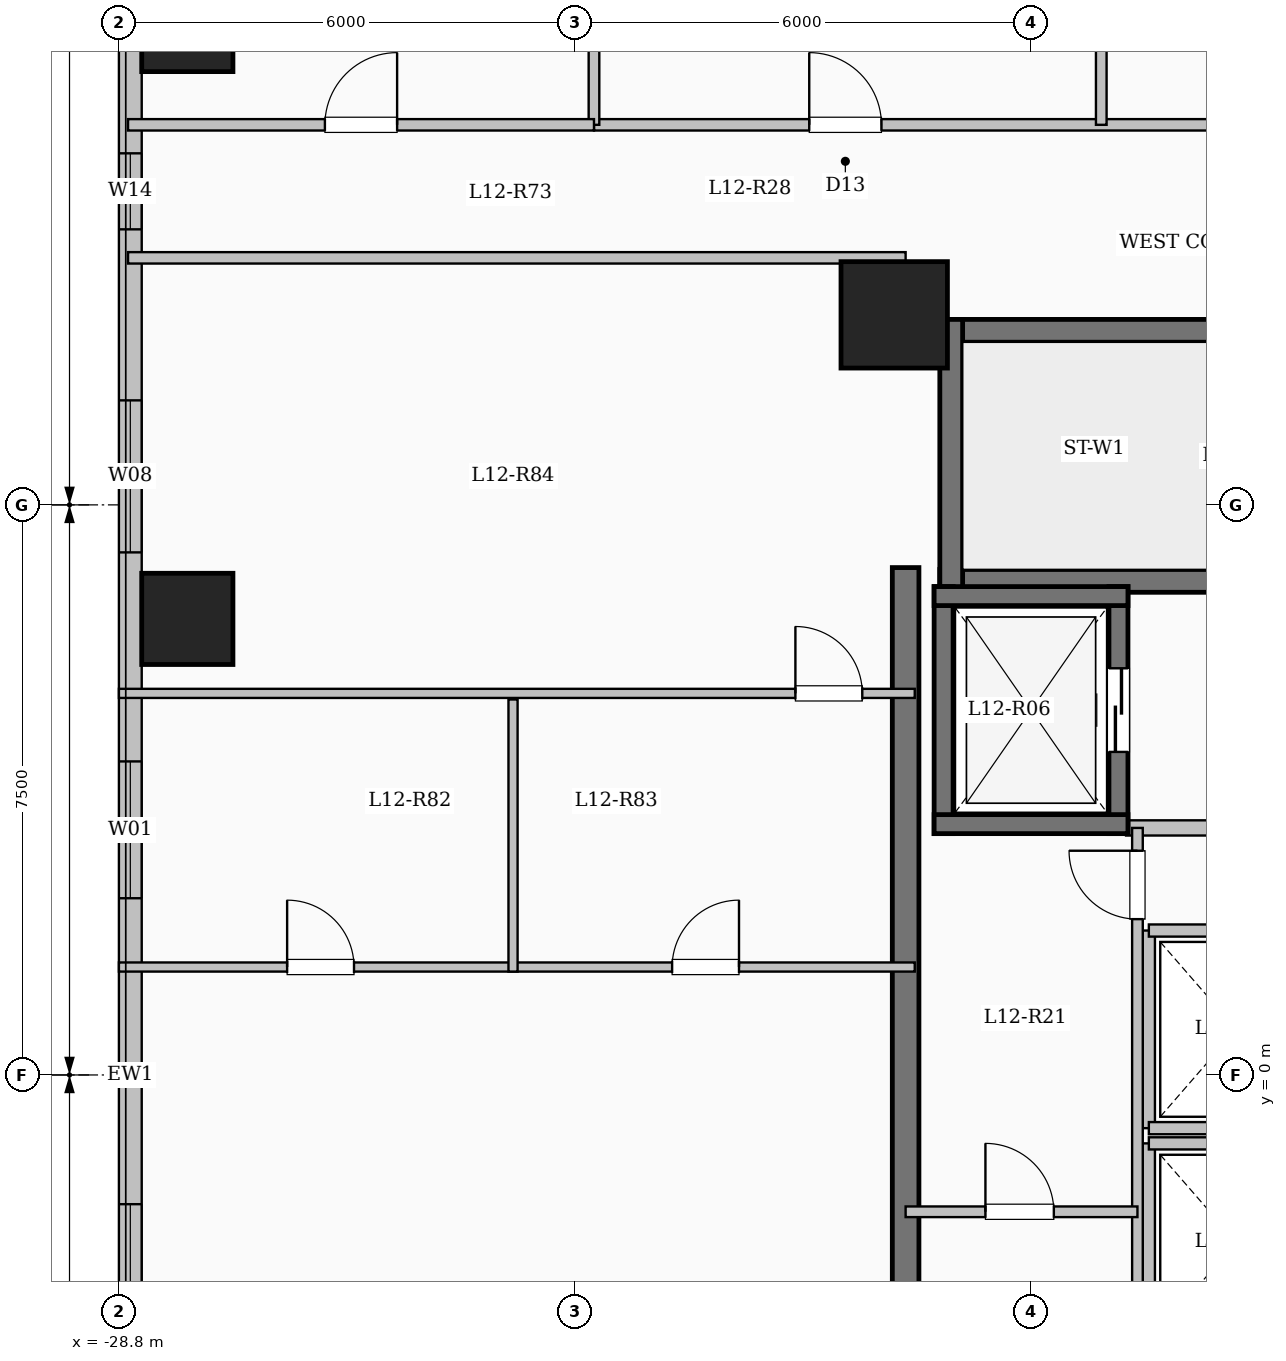
"""IFC4 building model, lengths in metres.
Left out: names, types, materials, properties, quantities, classifications, styles, units other than length and angle.
Written with IfcOpenShell. Run it as: python <this file> out.ifc"""

import sys

from ifc_helpers import new_model, si_unit, direction, frame, frame_2d, origin, origin_2d, place, context, subcontext, project, spatial, rectangle, extrude, element, fill, save


model = new_model("IFC4")
c1 = context("Model", 3, precision=1e-05, world=origin(), true_north=direction((0.0, 1.0)))
c2 = subcontext(c1, "Body", "Model", "MODEL_VIEW")
j1 = project(units=[si_unit("LENGTHUNIT", "METRE"), si_unit("PLANEANGLEUNIT", "RADIAN")], contexts=[c1])
p1 = place(None, origin())
s1 = spatial("IfcSite", under=j1, at=p1, CompositionType="ELEMENT")
p2 = place(p1, origin())
s2 = spatial("IfcBuilding", under=s1, at=p2, CompositionType="ELEMENT")
p3 = place(p2, frame((0.0, 0.0, 47.45)))
s3 = spatial("IfcBuildingStorey", under=s2, at=p3, CompositionType="ELEMENT", Elevation=47.45)
p4 = place(p3, frame((-18.6, 10.0, 0.0), z_axis=(0.0, 0.0, 1.0), x_axis=(1.0, 0.0, 0.0)))
e1 = element("IfcColumn", 1, at=p4, inside=s3, PredefinedType="COLUMN", context=c2, shape_type="SweptSolid", body=[
    extrude(rectangle(XDim=1.4, YDim=1.4, at=origin_2d()), origin(), (0.0, 0.0, 1.0), 3.35),
])
for number, where, z_axis, x_axis in (
    (2, (-27.9, 6.0, 0.0), (0.0, 0.0, 1.0), (1.0, 0.0, 0.0)),
    (3, (-27.9, 13.8, 0.0), (0.0, 0.0, 1.0), (1.0, 0.0, 0.0)),
):
    element("IfcColumn", number, at=place(p3, frame(where, z_axis=z_axis, x_axis=x_axis)), inside=s3, PredefinedType="COLUMN", context=c2, shape_type="SweptSolid", body=[
        extrude(rectangle(XDim=1.2, YDim=1.2, at=origin_2d()), origin(), (0.0, 0.0, 1.0), 3.35),
    ])
p5 = place(p3, frame((-28.65, -19.05, 0.0), z_axis=(0.0, 0.0, 1.0), x_axis=(0.0, 1.0, 0.0)))
e4 = element("IfcWall", 4, at=p5, inside=s3, PredefinedType="SOLIDWALL", context=c2, shape_type="SweptSolid", body=[
    extrude(rectangle(XDim=38.1, YDim=0.3, at=frame_2d((19.05, 0.0))), origin(), (0.0, 0.0, 1.0), 3.1),
])
p6 = place(p5, frame((3.15, 0.0, 0.9)))
e5 = element("IfcOpeningElement", 5, at=p6, cuts=e4, PredefinedType="OPENING", context=c2, shape_type="SweptSolid", body=[
    extrude(rectangle(XDim=2.4, YDim=1.8, at=frame_2d((1.2, 0.9))), frame((0.0, 0.16, 0.0), z_axis=(0.0, -1.0, 0.0), x_axis=(1.0, 0.0, 0.0)), (0.0, 0.0, 1.0), 0.32),
])
p7 = place(p5, frame((9.542, 0.0, 0.9)))
e6 = element("IfcOpeningElement", 6, at=p7, cuts=e4, PredefinedType="OPENING", context=c2, shape_type="SweptSolid", body=[
    extrude(rectangle(XDim=1.5, YDim=1.65, at=frame_2d((0.75, 0.825))), frame((0.0, 0.16, 0.0), z_axis=(0.0, -1.0, 0.0), x_axis=(1.0, 0.0, 0.0)), (0.0, 0.0, 1.0), 0.32),
])
p8 = place(p5, frame((14.95, 0.0, 0.9)))
e7 = element("IfcOpeningElement", 7, at=p8, cuts=e4, PredefinedType="OPENING", context=c2, shape_type="SweptSolid", body=[
    extrude(rectangle(XDim=2.4, YDim=1.8, at=frame_2d((1.2, 0.9))), frame((0.0, 0.16, 0.0), z_axis=(0.0, -1.0, 0.0), x_axis=(1.0, 0.0, 0.0)), (0.0, 0.0, 1.0), 0.32),
])
p9 = place(p5, frame((21.375, 0.0, 0.9)))
e8 = element("IfcOpeningElement", 8, at=p9, cuts=e4, PredefinedType="OPENING", context=c2, shape_type="SweptSolid", body=[
    extrude(rectangle(XDim=1.8, YDim=1.65, at=frame_2d((0.9, 0.825))), frame((0.0, 0.16, 0.0), z_axis=(0.0, -1.0, 0.0), x_axis=(1.0, 0.0, 0.0)), (0.0, 0.0, 1.0), 0.32),
])
p10 = place(p5, frame((25.925, 0.0, 0.9)))
e9 = element("IfcOpeningElement", 9, at=p10, cuts=e4, PredefinedType="OPENING", context=c2, shape_type="SweptSolid", body=[
    extrude(rectangle(XDim=2.0, YDim=1.7, at=frame_2d((1.0, 0.85))), frame((0.0, 0.16, 0.0), z_axis=(0.0, -1.0, 0.0), x_axis=(1.0, 0.0, 0.0)), (0.0, 0.0, 1.0), 0.32),
])
p11 = place(p5, frame((30.175, 0.0, 0.95)))
e10 = element("IfcOpeningElement", 10, at=p11, cuts=e4, PredefinedType="OPENING", context=c2, shape_type="SweptSolid", body=[
    extrude(rectangle(XDim=1.0, YDim=1.5, at=frame_2d((0.5, 0.75))), frame((0.0, 0.16, 0.0), z_axis=(0.0, -1.0, 0.0), x_axis=(1.0, 0.0, 0.0)), (0.0, 0.0, 1.0), 0.32),
])
p12 = place(p5, frame((33.85, 0.0, 0.9)))
e11 = element("IfcOpeningElement", 11, at=p12, cuts=e4, PredefinedType="OPENING", context=c2, shape_type="SweptSolid", body=[
    extrude(rectangle(XDim=2.0, YDim=1.7, at=frame_2d((1.0, 0.85))), frame((0.0, 0.16, 0.0), z_axis=(0.0, -1.0, 0.0), x_axis=(1.0, 0.0, 0.0)), (0.0, 0.0, 1.0), 0.32),
])
p13 = place(p3, frame((-18.0, 9.79, 0.0), z_axis=(0.0, 0.0, 1.0), x_axis=(1.0, 0.0, 0.0)))
e12 = element("IfcWall", 12, at=p13, inside=s3, PredefinedType="SHEAR", context=c2, shape_type="SweptSolid", body=[
    extrude(rectangle(XDim=8.0, YDim=0.3, at=frame_2d((4.0, 0.0))), origin(), (0.0, 0.0, 1.0), 3.35),
])
p14 = place(p3, frame((-18.0, 6.5, 0.0), z_axis=(0.0, 0.0, 1.0), x_axis=(1.0, 0.0, 0.0)))
e13 = element("IfcWall", 13, at=p14, inside=s3, PredefinedType="SHEAR", context=c2, shape_type="SweptSolid", body=[
    extrude(rectangle(XDim=8.0, YDim=0.3, at=frame_2d((4.0, 0.0))), origin(), (0.0, 0.0, 1.0), 3.35),
])
p15 = place(p14, frame((6.45, 0.0, 0.0)))
e14 = element("IfcOpeningElement", 14, at=p15, cuts=e13, PredefinedType="OPENING", context=c2, shape_type="SweptSolid", body=[
    extrude(rectangle(XDim=1.0, YDim=2.15, at=frame_2d((0.5, 1.075))), frame((0.0, 0.16, 0.0), z_axis=(0.0, -1.0, 0.0), x_axis=(1.0, 0.0, 0.0)), (0.0, 0.0, 1.0), 0.32),
])
p16 = place(p3, frame((-17.85, 6.35, 0.0), z_axis=(0.0, 0.0, 1.0), x_axis=(0.0, 1.0, 0.0)))
e15 = element("IfcWall", 15, at=p16, inside=s3, PredefinedType="SHEAR", context=c2, shape_type="SweptSolid", body=[
    extrude(rectangle(XDim=3.59, YDim=0.3, at=frame_2d((1.795, 0.0))), origin(), (0.0, 0.0, 1.0), 3.35),
])
p17 = place(p3, frame((-15.55, 3.25, 0.0), z_axis=(0.0, 0.0, 1.0), x_axis=(1.0, 0.0, 0.0)))
e16 = element("IfcWall", 16, at=p17, inside=s3, PredefinedType="SOLIDWALL", context=c2, shape_type="SweptSolid", body=[
    extrude(rectangle(XDim=5.4, YDim=0.2, at=frame_2d((2.7, 0.0))), origin(), (0.0, 0.0, 1.0), 3.1),
])
p18 = place(p3, frame((-17.95, 3.175, 0.0), z_axis=(0.0, 0.0, 1.0), x_axis=(0.0, 1.0, 0.0)))
e17 = element("IfcWall", 17, at=p18, inside=s3, PredefinedType="SHEAR", context=c2, shape_type="SweptSolid", body=[
    extrude(rectangle(XDim=3.25, YDim=0.25, at=frame_2d((1.625, 0.0))), origin(), (0.0, 0.0, 1.0), 3.35),
])
p19 = place(p3, frame((-15.65, 3.175, 0.0), z_axis=(0.0, 0.0, 1.0), x_axis=(0.0, 1.0, 0.0)))
e18 = element("IfcWall", 18, at=p19, inside=s3, PredefinedType="SHEAR", context=c2, shape_type="SweptSolid", body=[
    extrude(rectangle(XDim=3.25, YDim=0.25, at=frame_2d((1.625, 0.0))), origin(), (0.0, 0.0, 1.0), 3.35),
])
p20 = place(p19, frame((1.075, 0.0, 0.0)))
e19 = element("IfcOpeningElement", 19, at=p20, cuts=e18, PredefinedType="OPENING", context=c2, shape_type="SweptSolid", body=[
    extrude(rectangle(XDim=1.1, YDim=2.15, at=frame_2d((0.55, 1.075))), frame((0.0, 0.135, 0.0), z_axis=(0.0, -1.0, 0.0), x_axis=(1.0, 0.0, 0.0)), (0.0, 0.0, 1.0), 0.27),
])
for number, where, z_axis, x_axis in (
    (20, (-18.075, 3.3, 0.0), (0.0, 0.0, 1.0), (1.0, 0.0, 0.0)),
    (21, (-18.075, 6.3, 0.0), (0.0, 0.0, 1.0), (1.0, 0.0, 0.0)),
):
    element("IfcWall", number, at=place(p3, frame(where, z_axis=z_axis, x_axis=x_axis)), inside=s3, PredefinedType="SHEAR", context=c2, shape_type="SweptSolid", body=[
        extrude(rectangle(XDim=2.55, YDim=0.25, at=frame_2d((1.275, 0.0))), origin(), (0.0, 0.0, 1.0), 3.35),
    ])
p21 = place(p3, frame((-15.25, -3.5, 0.0), z_axis=(0.0, 0.0, 1.0), x_axis=(0.0, 1.0, 0.0)))
e22 = element("IfcWall", 22, at=p21, inside=s3, PredefinedType="SOLIDWALL", context=c2, shape_type="SweptSolid", body=[
    extrude(rectangle(XDim=2.6, YDim=0.16, at=frame_2d((1.3, 0.0))), origin(), (0.0, 0.0, 1.0), 3.1),
])
p22 = place(p3, frame((-15.25, -0.9, 0.0), z_axis=(0.0, 0.0, 1.0), x_axis=(1.0, 0.0, 0.0)))
e23 = element("IfcWall", 23, at=p22, inside=s3, PredefinedType="SOLIDWALL", context=c2, shape_type="SweptSolid", body=[
    extrude(rectangle(XDim=2.3, YDim=0.16, at=frame_2d((1.15, 0.0))), origin(), (0.0, 0.0, 1.0), 3.1),
])
p23 = place(p3, frame((-15.25, -0.7, 0.0), z_axis=(0.0, 0.0, 1.0), x_axis=(0.0, 1.0, 0.0)))
e24 = element("IfcWall", 24, at=p23, inside=s3, PredefinedType="SOLIDWALL", context=c2, shape_type="SweptSolid", body=[
    extrude(rectangle(XDim=2.6, YDim=0.16, at=frame_2d((1.3, 0.0))), origin(), (0.0, 0.0, 1.0), 3.1),
])
for number, where, z_axis, x_axis in (
    (25, (-15.25, -0.7, 0.0), (0.0, 0.0, 1.0), (1.0, 0.0, 0.0)),
    (26, (-15.25, 1.9, 0.0), (0.0, 0.0, 1.0), (1.0, 0.0, 0.0)),
):
    element("IfcWall", number, at=place(p3, frame(where, z_axis=z_axis, x_axis=x_axis)), inside=s3, PredefinedType="SOLIDWALL", context=c2, shape_type="SweptSolid", body=[
        extrude(rectangle(XDim=2.3, YDim=0.16, at=frame_2d((1.15, 0.0))), origin(), (0.0, 0.0, 1.0), 3.1),
    ])
p24 = place(p3, frame((-18.45, -7.375, 0.0), z_axis=(0.0, 0.0, 1.0), x_axis=(0.0, 1.0, 0.0)))
e27 = element("IfcWall", 27, at=p24, inside=s3, PredefinedType="SHEAR", context=c2, shape_type="SweptSolid", body=[
    extrude(rectangle(XDim=14.05, YDim=0.35, at=frame_2d((7.025, 0.0))), origin(), (0.0, 0.0, 1.0), 3.35),
])
p25 = place(p3, frame((-15.4, -7.2, 0.0), z_axis=(0.0, 0.0, 1.0), x_axis=(0.0, 1.0, 0.0)))
e28 = element("IfcWall", 28, at=p25, inside=s3, PredefinedType="PARTITIONING", context=c2, shape_type="SweptSolid", body=[
    extrude(rectangle(XDim=10.45, YDim=0.14, at=frame_2d((5.225, 0.0))), origin(), (0.0, 0.0, 1.0), 3.1),
])
p26 = place(p25, frame((9.25, 0.0, 0.0)))
e29 = element("IfcOpeningElement", 29, at=p26, cuts=e28, PredefinedType="OPENING", context=c2, shape_type="SweptSolid", body=[
    extrude(rectangle(XDim=0.9, YDim=2.08, at=frame_2d((0.45, 1.04))), frame((0.0, 0.08, 0.0), z_axis=(0.0, -1.0, 0.0), x_axis=(1.0, 0.0, 0.0)), (0.0, 0.0, 1.0), 0.16),
])
p27 = place(p3, frame((-18.45, -1.8, 0.0), z_axis=(0.0, 0.0, 1.0), x_axis=(1.0, 0.0, 0.0)))
e30 = element("IfcWall", 30, at=p27, inside=s3, PredefinedType="PARTITIONING", context=c2, shape_type="SweptSolid", body=[
    extrude(rectangle(XDim=3.05, YDim=0.14, at=frame_2d((1.525, 0.0))), origin(), (0.0, 0.0, 1.0), 3.1),
])
p28 = place(p27, frame((1.05, 0.0, 0.0)))
e31 = element("IfcOpeningElement", 31, at=p28, cuts=e30, PredefinedType="OPENING", context=c2, shape_type="SweptSolid", body=[
    extrude(rectangle(XDim=0.9, YDim=2.08, at=frame_2d((0.45, 1.04))), frame((0.0, 0.08, 0.0), z_axis=(0.0, -1.0, 0.0), x_axis=(1.0, 0.0, 0.0)), (0.0, 0.0, 1.0), 0.16),
])
p29 = place(p3, frame((-22.55, 12.5, 0.0), z_axis=(0.0, 0.0, 1.0), x_axis=(1.0, 0.0, 0.0)))
e32 = element("IfcWall", 32, at=p29, inside=s3, PredefinedType="PARTITIONING", context=c2, shape_type="SweptSolid", body=[
    extrude(rectangle(XDim=18.7, YDim=0.15, at=frame_2d((9.35, 0.0))), origin(), (0.0, 0.0, 1.0), 3.1),
])
p30 = place(p29, frame((2.832, 0.0, 0.0)))
e33 = element("IfcOpeningElement", 33, at=p30, cuts=e32, PredefinedType="OPENING", context=c2, shape_type="SweptSolid", body=[
    extrude(rectangle(XDim=0.95, YDim=2.15, at=frame_2d((0.475, 1.075))), frame((0.0, 0.085, 0.0), z_axis=(0.0, -1.0, 0.0), x_axis=(1.0, 0.0, 0.0)), (0.0, 0.0, 1.0), 0.17),
])
p31 = place(p29, frame((9.537, 0.0, 0.0)))
e34 = element("IfcOpeningElement", 34, at=p31, cuts=e32, PredefinedType="OPENING", context=c2, shape_type="SweptSolid", body=[
    extrude(rectangle(XDim=0.95, YDim=2.15, at=frame_2d((0.475, 1.075))), frame((0.0, 0.085, 0.0), z_axis=(0.0, -1.0, 0.0), x_axis=(1.0, 0.0, 0.0)), (0.0, 0.0, 1.0), 0.17),
])
p32 = place(p29, frame((15.5, 0.0, 0.0)))
e35 = element("IfcOpeningElement", 35, at=p32, cuts=e32, PredefinedType="OPENING", context=c2, shape_type="SweptSolid", body=[
    extrude(rectangle(XDim=0.95, YDim=2.15, at=frame_2d((0.475, 1.075))), frame((0.0, 0.085, 0.0), z_axis=(0.0, -1.0, 0.0), x_axis=(1.0, 0.0, 0.0)), (0.0, 0.0, 1.0), 0.17),
])
p33 = place(p3, frame((-15.876, 12.5, 0.0), z_axis=(0.0, 0.0, 1.0), x_axis=(0.0, 1.0, 0.0)))
e36 = element("IfcWall", 36, at=p33, inside=s3, PredefinedType="PARTITIONING", context=c2, shape_type="SweptSolid", body=[
    extrude(rectangle(XDim=11.05, YDim=0.14, at=frame_2d((5.525, 0.0))), origin(), (0.0, 0.0, 1.0), 3.1),
])
p34 = place(p3, frame((-28.68, 10.75, 0.0), z_axis=(0.0, 0.0, 1.0), x_axis=(1.0, 0.0, 0.0)))
e37 = element("IfcWall", 37, at=p34, inside=s3, PredefinedType="PARTITIONING", context=c2, shape_type="SweptSolid", body=[
    extrude(rectangle(XDim=10.23, YDim=0.15, at=frame_2d((5.115, 0.0))), origin(), (0.0, 0.0, 1.0), 3.1),
])
p35 = place(p3, frame((-22.55, 12.5, 0.0), z_axis=(0.0, 0.0, 1.0), x_axis=(0.0, 1.0, 0.0)))
e38 = element("IfcWall", 38, at=p35, inside=s3, PredefinedType="PARTITIONING", context=c2, shape_type="SweptSolid", body=[
    extrude(rectangle(XDim=6.55, YDim=0.14, at=frame_2d((3.275, 0.0))), origin(), (0.0, 0.0, 1.0), 3.1),
])
p36 = place(p3, frame((-28.68, 12.5, 0.0), z_axis=(0.0, 0.0, 1.0), x_axis=(1.0, 0.0, 0.0)))
e39 = element("IfcWall", 39, at=p36, inside=s3, PredefinedType="PARTITIONING", context=c2, shape_type="SweptSolid", body=[
    extrude(rectangle(XDim=6.13, YDim=0.15, at=frame_2d((3.065, 0.0))), origin(), (0.0, 0.0, 1.0), 3.1),
])
p37 = place(p36, frame((2.59, 0.0, 0.0)))
e40 = element("IfcOpeningElement", 40, at=p37, cuts=e39, PredefinedType="OPENING", context=c2, shape_type="SweptSolid", body=[
    extrude(rectangle(XDim=0.95, YDim=2.15, at=frame_2d((0.475, 1.075))), frame((0.0, 0.085, 0.0), z_axis=(0.0, -1.0, 0.0), x_axis=(1.0, 0.0, 0.0)), (0.0, 0.0, 1.0), 0.17),
])
p38 = place(p3, frame((-28.8, 1.42, 0.0), z_axis=(0.0, 0.0, 1.0), x_axis=(1.0, 0.0, 0.0)))
e41 = element("IfcWall", 41, at=p38, inside=s3, PredefinedType="PARTITIONING", context=c2, shape_type="SweptSolid", body=[
    extrude(rectangle(XDim=10.47, YDim=0.12, at=frame_2d((5.235, 0.0))), origin(), (0.0, 0.0, 1.0), 3.1),
])
p39 = place(p38, frame((2.213, 0.0, 0.0)))
e42 = element("IfcOpeningElement", 42, at=p39, cuts=e41, PredefinedType="OPENING", context=c2, shape_type="SweptSolid", body=[
    extrude(rectangle(XDim=0.88, YDim=2.1, at=frame_2d((0.44, 1.05))), frame((0.0, 0.07, 0.0), z_axis=(0.0, -1.0, 0.0), x_axis=(1.0, 0.0, 0.0)), (0.0, 0.0, 1.0), 0.14),
])
p40 = place(p38, frame((7.278, 0.0, 0.0)))
e43 = element("IfcOpeningElement", 43, at=p40, cuts=e41, PredefinedType="OPENING", context=c2, shape_type="SweptSolid", body=[
    extrude(rectangle(XDim=0.88, YDim=2.1, at=frame_2d((0.44, 1.05))), frame((0.0, 0.07, 0.0), z_axis=(0.0, -1.0, 0.0), x_axis=(1.0, 0.0, 0.0)), (0.0, 0.0, 1.0), 0.14),
])
p41 = place(p3, frame((-28.8, 5.02, 0.0), z_axis=(0.0, 0.0, 1.0), x_axis=(1.0, 0.0, 0.0)))
e44 = element("IfcWall", 44, at=p41, inside=s3, PredefinedType="PARTITIONING", context=c2, shape_type="SweptSolid", body=[
    extrude(rectangle(XDim=10.47, YDim=0.12, at=frame_2d((5.235, 0.0))), origin(), (0.0, 0.0, 1.0), 3.1),
])
p42 = place(p41, frame((8.9, 0.0, 0.0)))
e45 = element("IfcOpeningElement", 45, at=p42, cuts=e44, PredefinedType="OPENING", context=c2, shape_type="SweptSolid", body=[
    extrude(rectangle(XDim=0.88, YDim=2.1, at=frame_2d((0.44, 1.05))), frame((0.0, 0.07, 0.0), z_axis=(0.0, -1.0, 0.0), x_axis=(1.0, 0.0, 0.0)), (0.0, 0.0, 1.0), 0.14),
])
p43 = place(p3, frame((-23.615, 1.36, 0.0), z_axis=(0.0, 0.0, 1.0), x_axis=(0.0, 1.0, 0.0)))
e46 = element("IfcWall", 46, at=p43, inside=s3, PredefinedType="PARTITIONING", context=c2, shape_type="SweptSolid", body=[
    extrude(rectangle(XDim=3.58, YDim=0.12, at=frame_2d((1.79, 0.0))), origin(), (0.0, 0.0, 1.0), 3.1),
])
p44 = place(p8, origin())
e47 = element("IfcWindow", 47, at=p44, inside=s3, PartitioningType="SINGLE_PANEL", PredefinedType="WINDOW", context=c2, shape_type="SweptSolid", body=[
    extrude(rectangle(XDim=2.4, YDim=1.8, at=frame_2d((1.2, 0.9))), frame((0.0, 0.03, 0.0), z_axis=(0.0, -1.0, 0.0), x_axis=(1.0, 0.0, 0.0)), (0.0, 0.0, 1.0), 0.06),
])
fill(e7, e47)
p45 = place(p9, origin())
e48 = element("IfcWindow", 48, at=p45, inside=s3, PartitioningType="SINGLE_PANEL", PredefinedType="WINDOW", context=c2, shape_type="SweptSolid", body=[
    extrude(rectangle(XDim=1.8, YDim=1.65, at=frame_2d((0.9, 0.825))), frame((0.0, 0.03, 0.0), z_axis=(0.0, -1.0, 0.0), x_axis=(1.0, 0.0, 0.0)), (0.0, 0.0, 1.0), 0.06),
])
fill(e8, e48)
p46 = place(p10, origin())
e49 = element("IfcWindow", 49, at=p46, inside=s3, PartitioningType="SINGLE_PANEL", PredefinedType="WINDOW", context=c2, shape_type="SweptSolid", body=[
    extrude(rectangle(XDim=2.0, YDim=1.7, at=frame_2d((1.0, 0.85))), frame((0.0, 0.03, 0.0), z_axis=(0.0, -1.0, 0.0), x_axis=(1.0, 0.0, 0.0)), (0.0, 0.0, 1.0), 0.06),
])
fill(e9, e49)
p47 = place(p11, origin())
e50 = element("IfcWindow", 50, at=p47, inside=s3, PartitioningType="SINGLE_PANEL", PredefinedType="WINDOW", context=c2, shape_type="SweptSolid", body=[
    extrude(rectangle(XDim=1.0, YDim=1.5, at=frame_2d((0.5, 0.75))), frame((0.0, 0.03, 0.0), z_axis=(0.0, -1.0, 0.0), x_axis=(1.0, 0.0, 0.0)), (0.0, 0.0, 1.0), 0.06),
])
fill(e10, e50)
p48 = place(p20, origin())
e51 = element("IfcDoor", 51, at=p48, inside=s3, OperationType="SLIDING_TO_LEFT", PredefinedType="DOOR", context=c2, shape_type="SweptSolid", body=[
    extrude(rectangle(XDim=1.1, YDim=2.15, at=frame_2d((0.55, 1.075))), frame((0.0, 0.025, 0.0), z_axis=(0.0, -1.0, 0.0), x_axis=(1.0, 0.0, 0.0)), (0.0, 0.0, 1.0), 0.05),
])
fill(e19, e51)
p49 = place(p26, origin())
e52 = element("IfcDoor", 52, at=p49, inside=s3, OperationType="SINGLE_SWING_RIGHT", PredefinedType="DOOR", context=c2, shape_type="SweptSolid", body=[
    extrude(rectangle(XDim=0.9, YDim=2.08, at=frame_2d((0.45, 1.04))), frame((0.0, 0.025, 0.0), z_axis=(0.0, -1.0, 0.0), x_axis=(1.0, 0.0, 0.0)), (0.0, 0.0, 1.0), 0.05),
])
fill(e29, e52)
p50 = place(p28, origin())
e53 = element("IfcDoor", 53, at=p50, inside=s3, OperationType="SINGLE_SWING_LEFT", PredefinedType="DOOR", context=c2, shape_type="SweptSolid", body=[
    extrude(rectangle(XDim=0.9, YDim=2.08, at=frame_2d((0.45, 1.04))), frame((0.0, 0.025, 0.0), z_axis=(0.0, -1.0, 0.0), x_axis=(1.0, 0.0, 0.0)), (0.0, 0.0, 1.0), 0.05),
])
fill(e31, e53)
p51 = place(p30, origin())
e54 = element("IfcDoor", 54, at=p51, inside=s3, OperationType="SINGLE_SWING_LEFT", PredefinedType="DOOR", context=c2, shape_type="SweptSolid", body=[
    extrude(rectangle(XDim=0.95, YDim=2.15, at=frame_2d((0.475, 1.075))), frame((0.0, 0.025, 0.0), z_axis=(0.0, -1.0, 0.0), x_axis=(1.0, 0.0, 0.0)), (0.0, 0.0, 1.0), 0.05),
])
fill(e33, e54)
p52 = place(p37, origin())
e55 = element("IfcDoor", 55, at=p52, inside=s3, OperationType="SINGLE_SWING_RIGHT", PredefinedType="DOOR", context=c2, shape_type="SweptSolid", body=[
    extrude(rectangle(XDim=0.95, YDim=2.15, at=frame_2d((0.475, 1.075))), frame((0.0, 0.025, 0.0), z_axis=(0.0, -1.0, 0.0), x_axis=(1.0, 0.0, 0.0)), (0.0, 0.0, 1.0), 0.05),
])
fill(e40, e55)
p53 = place(p39, origin())
e56 = element("IfcDoor", 56, at=p53, inside=s3, OperationType="SINGLE_SWING_LEFT", PredefinedType="DOOR", context=c2, shape_type="SweptSolid", body=[
    extrude(rectangle(XDim=0.88, YDim=2.1, at=frame_2d((0.44, 1.05))), frame((0.0, 0.025, 0.0), z_axis=(0.0, -1.0, 0.0), x_axis=(1.0, 0.0, 0.0)), (0.0, 0.0, 1.0), 0.05),
])
fill(e42, e56)
p54 = place(p40, origin())
e57 = element("IfcDoor", 57, at=p54, inside=s3, OperationType="SINGLE_SWING_RIGHT", PredefinedType="DOOR", context=c2, shape_type="SweptSolid", body=[
    extrude(rectangle(XDim=0.88, YDim=2.1, at=frame_2d((0.44, 1.05))), frame((0.0, 0.025, 0.0), z_axis=(0.0, -1.0, 0.0), x_axis=(1.0, 0.0, 0.0)), (0.0, 0.0, 1.0), 0.05),
])
fill(e43, e57)
p55 = place(p42, origin())
e58 = element("IfcDoor", 58, at=p55, inside=s3, OperationType="SINGLE_SWING_LEFT", PredefinedType="DOOR", context=c2, shape_type="SweptSolid", body=[
    extrude(rectangle(XDim=0.88, YDim=2.1, at=frame_2d((0.44, 1.05))), frame((0.0, 0.025, 0.0), z_axis=(0.0, -1.0, 0.0), x_axis=(1.0, 0.0, 0.0)), (0.0, 0.0, 1.0), 0.05),
])
fill(e45, e58)
save(model, sys.argv[1])
